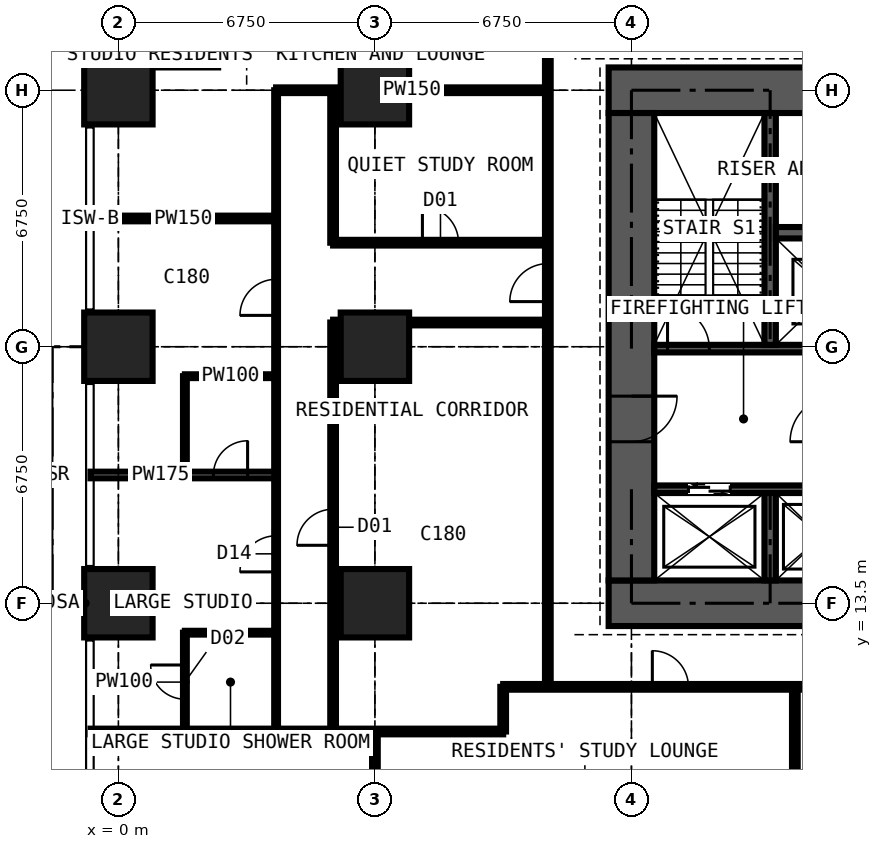
"""IFC4 building model, lengths in metres.
Left out: names, types, materials, properties, quantities, classifications, styles, units other than length and angle.
Written with IfcOpenShell. Run it as: python <this file> out.ifc"""

import sys

from ifc_helpers import new_model, si_unit, direction, frame, frame_2d, origin, origin_2d, place, context, subcontext, project, spatial, rectangle, extrude, element, fill, save


model = new_model("IFC4")
c1 = context("Model", 3, precision=1e-05, world=origin(), true_north=direction((0.0, 1.0)))
c2 = subcontext(c1, "Body", "Model", "MODEL_VIEW")
j1 = project(units=[si_unit("LENGTHUNIT", "METRE"), si_unit("PLANEANGLEUNIT", "RADIAN")], contexts=[c1])
p1 = place(None, origin())
s1 = spatial("IfcSite", under=j1, at=p1, CompositionType="ELEMENT")
p2 = place(p1, origin())
s2 = spatial("IfcBuilding", under=s1, at=p2, CompositionType="ELEMENT")
p3 = place(p2, frame((0.0, 0.0, 90.9)))
s3 = spatial("IfcBuildingStorey", under=s2, at=p3, CompositionType="ELEMENT", Elevation=90.9)
for number, where, z_axis, x_axis in (
    (1, (0.0, 13.5, 0.0), (0.0, 0.0, 1.0), (1.0, 0.0, 0.0)),
    (2, (0.0, 20.25, 0.0), (0.0, 0.0, 1.0), (1.0, 0.0, 0.0)),
    (3, (0.0, 27.0, 0.0), (0.0, 0.0, 1.0), (1.0, 0.0, 0.0)),
    (4, (6.75, 13.5, 0.0), (0.0, 0.0, 1.0), (1.0, 0.0, 0.0)),
    (5, (6.75, 20.25, 0.0), (0.0, 0.0, 1.0), (1.0, 0.0, 0.0)),
    (6, (6.75, 27.0, 0.0), (0.0, 0.0, 1.0), (1.0, 0.0, 0.0)),
):
    element("IfcColumn", number, at=place(p3, frame(where, z_axis=z_axis, x_axis=x_axis)), inside=s3, PredefinedType="COLUMN", context=c2, shape_type="SweptSolid", body=[
        extrude(rectangle(XDim=1.8, YDim=1.8, at=origin_2d()), origin(), (0.0, 0.0, 1.0), 3.6),
    ])
p4 = place(p3, frame((12.9, 13.5, 0.0), z_axis=(0.0, 0.0, 1.0), x_axis=(1.0, 0.0, 0.0)))
e7 = element("IfcWall", 7, at=p4, inside=s3, PredefinedType="SHEAR", context=c2, shape_type="SweptSolid", body=[
    extrude(rectangle(XDim=14.7, YDim=1.2, at=frame_2d((7.35, 0.0))), origin(), (0.0, 0.0, 1.0), 3.6),
])
p5 = place(p3, frame((27.6, 27.0, 0.0), z_axis=(0.0, 0.0, 1.0), x_axis=(-1.0, 0.0, 0.0)))
e8 = element("IfcWall", 8, at=p5, inside=s3, PredefinedType="SHEAR", context=c2, shape_type="SweptSolid", body=[
    extrude(rectangle(XDim=14.7, YDim=1.2, at=frame_2d((7.35, 0.0))), origin(), (0.0, 0.0, 1.0), 3.6),
])
p6 = place(p5, frame((4.55, 0.0, 0.0)))
e9 = element("IfcOpeningElement", 9, at=p6, cuts=e8, PredefinedType="OPENING", context=c2, shape_type="SweptSolid", body=[
    extrude(rectangle(XDim=0.9, YDim=2.2, at=frame_2d((0.45, 1.1))), frame((0.0, 0.61, 0.0), z_axis=(0.0, -1.0, 0.0), x_axis=(1.0, 0.0, 0.0)), (0.0, 0.0, 1.0), 1.22),
])
p7 = place(p5, frame((7.525, 0.0, 0.0)))
e10 = element("IfcOpeningElement", 10, at=p7, cuts=e8, PredefinedType="OPENING", context=c2, shape_type="SweptSolid", body=[
    extrude(rectangle(XDim=1.0, YDim=2.2, at=frame_2d((0.5, 1.1))), frame((0.0, 0.61, 0.0), z_axis=(0.0, -1.0, 0.0), x_axis=(1.0, 0.0, 0.0)), (0.0, 0.0, 1.0), 1.22),
])
p8 = place(p3, frame((13.5, 26.4, 0.0), z_axis=(0.0, 0.0, 1.0), x_axis=(0.0, -1.0, 0.0)))
e11 = element("IfcWall", 11, at=p8, inside=s3, PredefinedType="SHEAR", context=c2, shape_type="SweptSolid", body=[
    extrude(rectangle(XDim=12.3, YDim=1.2, at=frame_2d((6.15, 0.0))), origin(), (0.0, 0.0, 1.0), 3.6),
])
p9 = place(p8, frame((7.45, 0.0, 0.0)))
e12 = element("IfcOpeningElement", 12, at=p9, cuts=e11, PredefinedType="OPENING", context=c2, shape_type="SweptSolid", body=[
    extrude(rectangle(XDim=1.2, YDim=2.2, at=frame_2d((0.6, 1.1))), frame((0.0, 0.61, 0.0), z_axis=(0.0, -1.0, 0.0), x_axis=(1.0, 0.0, 0.0)), (0.0, 0.0, 1.0), 1.22),
])
p10 = place(p3, frame((2.625, 31.125, 0.0), z_axis=(0.0, 0.0, 1.0), x_axis=(0.0, -1.0, 0.0)))
e13 = element("IfcWall", 13, at=p10, inside=s3, PredefinedType="SOLIDWALL", context=c2, shape_type="SweptSolid", body=[
    extrude(rectangle(XDim=3.375, YDim=0.3, at=frame_2d((1.688, 0.0))), origin(), (0.0, 0.0, 1.0), 3.375),
])
p11 = place(p10, frame((0.788, 0.0, 0.6)))
e14 = element("IfcOpeningElement", 14, at=p11, cuts=e13, PredefinedType="OPENING", context=c2, shape_type="SweptSolid", body=[
    extrude(rectangle(XDim=1.8, YDim=2.1, at=frame_2d((0.9, 1.05))), frame((0.0, 0.16, 0.0), z_axis=(0.0, -1.0, 0.0), x_axis=(1.0, 0.0, 0.0)), (0.0, 0.0, 1.0), 0.32),
])
p12 = place(p3, frame((2.625, 27.75, 0.0), z_axis=(0.0, 0.0, 1.0), x_axis=(-1.0, 0.0, 0.0)))
e15 = element("IfcWall", 15, at=p12, inside=s3, PredefinedType="SOLIDWALL", context=c2, shape_type="SweptSolid", body=[
    extrude(rectangle(XDim=3.375, YDim=0.3, at=frame_2d((1.688, 0.0))), origin(), (0.0, 0.0, 1.0), 3.375),
])
p13 = place(p12, frame((0.343, 0.0, 0.9)))
e16 = element("IfcOpeningElement", 16, at=p13, cuts=e15, PredefinedType="OPENING", context=c2, shape_type="SweptSolid", body=[
    extrude(rectangle(XDim=1.2, YDim=1.8, at=frame_2d((0.6, 0.9))), frame((0.0, 0.16, 0.0), z_axis=(0.0, -1.0, 0.0), x_axis=(1.0, 0.0, 0.0)), (0.0, 0.0, 1.0), 0.32),
])
p14 = place(p3, frame((14.1, 16.5, 0.0), z_axis=(0.0, 0.0, 1.0), x_axis=(1.0, 0.0, 0.0)))
e17 = element("IfcWall", 17, at=p14, inside=s3, PredefinedType="SHEAR", context=c2, shape_type="SweptSolid", body=[
    extrude(rectangle(XDim=12.3, YDim=0.2, at=frame_2d((6.15, 0.0))), origin(), (0.0, 0.0, 1.0), 3.6),
])
p15 = place(p14, frame((0.9, 0.0, 0.0)))
e18 = element("IfcOpeningElement", 18, at=p15, cuts=e17, PredefinedType="OPENING", context=c2, shape_type="SweptSolid", body=[
    extrude(rectangle(XDim=1.1, YDim=2.2, at=frame_2d((0.55, 1.1))), frame((0.0, 0.11, 0.0), z_axis=(0.0, -1.0, 0.0), x_axis=(1.0, 0.0, 0.0)), (0.0, 0.0, 1.0), 0.22),
])
p16 = place(p14, frame((9.5, 0.0, 0.0)))
e19 = element("IfcOpeningElement", 19, at=p16, cuts=e17, PredefinedType="OPENING", context=c2, shape_type="SweptSolid", body=[
    extrude(rectangle(XDim=1.1, YDim=2.2, at=frame_2d((0.55, 1.1))), frame((0.0, 0.11, 0.0), z_axis=(0.0, -1.0, 0.0), x_axis=(1.0, 0.0, 0.0)), (0.0, 0.0, 1.0), 0.22),
])
p17 = place(p3, frame((14.1, 20.2, 0.0), z_axis=(0.0, 0.0, 1.0), x_axis=(1.0, 0.0, 0.0)))
e20 = element("IfcWall", 20, at=p17, inside=s3, PredefinedType="SHEAR", context=c2, shape_type="SweptSolid", body=[
    extrude(rectangle(XDim=12.3, YDim=0.2, at=frame_2d((6.15, 0.0))), origin(), (0.0, 0.0, 1.0), 3.6),
])
p18 = place(p17, frame((0.35, 0.0, 0.0)))
e21 = element("IfcOpeningElement", 21, at=p18, cuts=e20, PredefinedType="OPENING", context=c2, shape_type="SweptSolid", body=[
    extrude(rectangle(XDim=1.1, YDim=2.2, at=frame_2d((0.55, 1.1))), frame((0.0, 0.11, 0.0), z_axis=(0.0, -1.0, 0.0), x_axis=(1.0, 0.0, 0.0)), (0.0, 0.0, 1.0), 0.22),
])
p19 = place(p17, frame((9.75, 0.0, 0.0)))
e22 = element("IfcOpeningElement", 22, at=p19, cuts=e20, PredefinedType="OPENING", context=c2, shape_type="SweptSolid", body=[
    extrude(rectangle(XDim=1.1, YDim=2.2, at=frame_2d((0.55, 1.1))), frame((0.0, 0.11, 0.0), z_axis=(0.0, -1.0, 0.0), x_axis=(1.0, 0.0, 0.0)), (0.0, 0.0, 1.0), 0.22),
])
p20 = place(p3, frame((17.15, 20.3, 0.0), z_axis=(0.0, 0.0, 1.0), x_axis=(0.0, 1.0, 0.0)))
e23 = element("IfcWall", 23, at=p20, inside=s3, PredefinedType="SHEAR", context=c2, shape_type="SweptSolid", body=[
    extrude(rectangle(XDim=6.1, YDim=0.3, at=frame_2d((3.05, 0.0))), origin(), (0.0, 0.0, 1.0), 3.6),
])
p21 = place(p3, frame((17.3, 23.25, 0.0), z_axis=(0.0, 0.0, 1.0), x_axis=(1.0, 0.0, 0.0)))
e24 = element("IfcWall", 24, at=p21, inside=s3, PredefinedType="SHEAR", context=c2, shape_type="SweptSolid", body=[
    extrude(rectangle(XDim=5.9, YDim=0.3, at=frame_2d((2.95, 0.0))), origin(), (0.0, 0.0, 1.0), 3.6),
])
p22 = place(p3, frame((17.15, 14.1, 0.0), z_axis=(0.0, 0.0, 1.0), x_axis=(0.0, 1.0, 0.0)))
e25 = element("IfcWall", 25, at=p22, inside=s3, PredefinedType="SHEAR", context=c2, shape_type="SweptSolid", body=[
    extrude(rectangle(XDim=2.3, YDim=0.3, at=frame_2d((1.15, 0.0))), origin(), (0.0, 0.0, 1.0), 3.6),
])
p23 = place(p3, frame((-0.734, 10.125, 0.0), z_axis=(0.0, 0.0, 1.0), x_axis=(1.0, 0.0, 0.0)))
e26 = element("IfcWall", 26, at=p23, inside=s3, PredefinedType="PARTITIONING", context=c2, shape_type="SweptSolid", body=[
    extrude(rectangle(XDim=10.859, YDim=0.15, at=frame_2d((5.429, 0.0))), origin(), (0.0, 0.0, 1.0), 3.375),
])
p24 = place(p3, frame((-0.734, 16.875, 0.0), z_axis=(0.0, 0.0, 1.0), x_axis=(1.0, 0.0, 0.0)))
e27 = element("IfcWall", 27, at=p24, inside=s3, PredefinedType="PARTITIONING", context=c2, shape_type="SweptSolid", body=[
    extrude(rectangle(XDim=4.884, YDim=0.175, at=frame_2d((2.442, 0.0))), origin(), (0.0, 0.0, 1.0), 3.375),
])
p25 = place(p24, frame((3.234, 0.0, 0.0)))
e28 = element("IfcOpeningElement", 28, at=p25, cuts=e27, PredefinedType="OPENING", context=c2, shape_type="SweptSolid", body=[
    extrude(rectangle(XDim=0.9, YDim=2.2, at=frame_2d((0.45, 1.1))), frame((0.0, 0.097, 0.0), z_axis=(0.0, -1.0, 0.0), x_axis=(1.0, 0.0, 0.0)), (0.0, 0.0, 1.0), 0.195),
])
p26 = place(p3, frame((-0.734, 23.625, 0.0), z_axis=(0.0, 0.0, 1.0), x_axis=(1.0, 0.0, 0.0)))
e29 = element("IfcWall", 29, at=p26, inside=s3, PredefinedType="PARTITIONING", context=c2, shape_type="SweptSolid", body=[
    extrude(rectangle(XDim=4.884, YDim=0.15, at=frame_2d((2.442, 0.0))), origin(), (0.0, 0.0, 1.0), 3.375),
])
p27 = place(p3, frame((1.75, 10.125, 0.0), z_axis=(0.0, 0.0, 1.0), x_axis=(0.0, 1.0, 0.0)))
e30 = element("IfcWall", 30, at=p27, inside=s3, PredefinedType="PARTITIONING", context=c2, shape_type="SweptSolid", body=[
    extrude(rectangle(XDim=2.6, YDim=0.1, at=frame_2d((1.3, 0.0))), origin(), (0.0, 0.0, 1.0), 3.375),
])
p28 = place(p27, frame((0.85, 0.0, 0.0)))
e31 = element("IfcOpeningElement", 31, at=p28, cuts=e30, PredefinedType="OPENING", context=c2, shape_type="SweptSolid", body=[
    extrude(rectangle(XDim=0.9, YDim=2.2, at=frame_2d((0.45, 1.1))), frame((0.0, 0.06, 0.0), z_axis=(0.0, -1.0, 0.0), x_axis=(1.0, 0.0, 0.0)), (0.0, 0.0, 1.0), 0.12),
])
p29 = place(p3, frame((1.75, 12.725, 0.0), z_axis=(0.0, 0.0, 1.0), x_axis=(1.0, 0.0, 0.0)))
e32 = element("IfcWall", 32, at=p29, inside=s3, PredefinedType="PARTITIONING", context=c2, shape_type="SweptSolid", body=[
    extrude(rectangle(XDim=2.4, YDim=0.1, at=frame_2d((1.2, 0.0))), origin(), (0.0, 0.0, 1.0), 3.375),
])
p30 = place(p3, frame((1.75, 16.875, 0.0), z_axis=(0.0, 0.0, 1.0), x_axis=(0.0, 1.0, 0.0)))
e33 = element("IfcWall", 33, at=p30, inside=s3, PredefinedType="PARTITIONING", context=c2, shape_type="SweptSolid", body=[
    extrude(rectangle(XDim=2.6, YDim=0.1, at=frame_2d((1.3, 0.0))), origin(), (0.0, 0.0, 1.0), 3.375),
])
p31 = place(p3, frame((1.75, 19.475, 0.0), z_axis=(0.0, 0.0, 1.0), x_axis=(1.0, 0.0, 0.0)))
e34 = element("IfcWall", 34, at=p31, inside=s3, PredefinedType="PARTITIONING", context=c2, shape_type="SweptSolid", body=[
    extrude(rectangle(XDim=2.4, YDim=0.1, at=frame_2d((1.2, 0.0))), origin(), (0.0, 0.0, 1.0), 3.375),
])
p32 = place(p3, frame((4.15, 10.125, 0.0), z_axis=(0.0, 0.0, 1.0), x_axis=(0.0, 1.0, 0.0)))
e35 = element("IfcWall", 35, at=p32, inside=s3, PredefinedType="PARTITIONING", context=c2, shape_type="SweptSolid", body=[
    extrude(rectangle(XDim=16.875, YDim=0.1, at=frame_2d((8.438, 0.0))), origin(), (0.0, 0.0, 1.0), 3.375),
])
p33 = place(p32, frame((4.2, 0.0, 0.0)))
e36 = element("IfcOpeningElement", 36, at=p33, cuts=e35, PredefinedType="OPENING", context=c2, shape_type="SweptSolid", body=[
    extrude(rectangle(XDim=0.95, YDim=2.2, at=frame_2d((0.475, 1.1))), frame((0.0, 0.06, 0.0), z_axis=(0.0, -1.0, 0.0), x_axis=(1.0, 0.0, 0.0)), (0.0, 0.0, 1.0), 0.12),
])
p34 = place(p32, frame((10.95, 0.0, 0.0)))
e37 = element("IfcOpeningElement", 37, at=p34, cuts=e35, PredefinedType="OPENING", context=c2, shape_type="SweptSolid", body=[
    extrude(rectangle(XDim=0.95, YDim=2.2, at=frame_2d((0.475, 1.1))), frame((0.0, 0.06, 0.0), z_axis=(0.0, -1.0, 0.0), x_axis=(1.0, 0.0, 0.0)), (0.0, 0.0, 1.0), 0.12),
])
p35 = place(p3, frame((4.15, 27.0, 0.0), z_axis=(0.0, 0.0, 1.0), x_axis=(1.0, 0.0, 0.0)))
e38 = element("IfcWall", 38, at=p35, inside=s3, PredefinedType="PARTITIONING", context=c2, shape_type="SweptSolid", body=[
    extrude(rectangle(XDim=7.15, YDim=0.15, at=frame_2d((3.575, 0.0))), origin(), (0.0, 0.0, 1.0), 2.806),
])
p36 = place(p3, frame((5.65, 10.125, 0.0), z_axis=(0.0, 0.0, 1.0), x_axis=(0.0, 1.0, 0.0)))
e39 = element("IfcWall", 39, at=p36, inside=s3, PredefinedType="PARTITIONING", context=c2, shape_type="SweptSolid", body=[
    extrude(rectangle(XDim=10.762, YDim=0.15, at=frame_2d((5.381, 0.0))), origin(), (0.0, 0.0, 1.0), 3.375),
])
p37 = place(p36, frame((4.9, 0.0, 0.0)))
e40 = element("IfcOpeningElement", 40, at=p37, cuts=e39, PredefinedType="OPENING", context=c2, shape_type="SweptSolid", body=[
    extrude(rectangle(XDim=0.95, YDim=2.2, at=frame_2d((0.475, 1.1))), frame((0.0, 0.085, 0.0), z_axis=(0.0, -1.0, 0.0), x_axis=(1.0, 0.0, 0.0)), (0.0, 0.0, 1.0), 0.17),
])
p38 = place(p3, frame((5.65, 20.887, 0.0), z_axis=(0.0, 0.0, 1.0), x_axis=(1.0, 0.0, 0.0)))
e41 = element("IfcWall", 41, at=p38, inside=s3, PredefinedType="PARTITIONING", context=c2, shape_type="SweptSolid", body=[
    extrude(rectangle(XDim=5.65, YDim=0.15, at=frame_2d((2.825, 0.0))), origin(), (0.0, 0.0, 1.0), 3.375),
])
p39 = place(p3, frame((5.65, 22.988, 0.0), z_axis=(0.0, 0.0, 1.0), x_axis=(0.0, 1.0, 0.0)))
e42 = element("IfcWall", 42, at=p39, inside=s3, PredefinedType="PARTITIONING", context=c2, shape_type="SweptSolid", body=[
    extrude(rectangle(XDim=4.012, YDim=0.15, at=frame_2d((2.006, 0.0))), origin(), (0.0, 0.0, 1.0), 3.375),
])
p40 = place(p3, frame((5.65, 22.988, 0.0), z_axis=(0.0, 0.0, 1.0), x_axis=(1.0, 0.0, 0.0)))
e43 = element("IfcWall", 43, at=p40, inside=s3, PredefinedType="PARTITIONING", context=c2, shape_type="SweptSolid", body=[
    extrude(rectangle(XDim=5.65, YDim=0.15, at=frame_2d((2.825, 0.0))), origin(), (0.0, 0.0, 1.0), 3.375),
])
p41 = place(p40, frame((2.35, 0.0, 0.0)))
e44 = element("IfcOpeningElement", 44, at=p41, cuts=e43, PredefinedType="OPENING", context=c2, shape_type="SweptSolid", body=[
    extrude(rectangle(XDim=0.95, YDim=2.2, at=frame_2d((0.475, 1.1))), frame((0.0, 0.085, 0.0), z_axis=(0.0, -1.0, 0.0), x_axis=(1.0, 0.0, 0.0)), (0.0, 0.0, 1.0), 0.17),
])
p42 = place(p3, frame((6.75, 4.15, 0.0), z_axis=(0.0, 0.0, 1.0), x_axis=(0.0, 1.0, 0.0)))
e45 = element("IfcWall", 45, at=p42, inside=s3, PredefinedType="PARTITIONING", context=c2, shape_type="SweptSolid", body=[
    extrude(rectangle(XDim=5.975, YDim=0.15, at=frame_2d((2.988, 0.0))), origin(), (0.0, 0.0, 1.0), 2.877),
])
p43 = place(p3, frame((10.125, 10.125, 0.0), z_axis=(0.0, 0.0, 1.0), x_axis=(0.0, 1.0, 0.0)))
e46 = element("IfcWall", 46, at=p43, inside=s3, PredefinedType="PARTITIONING", context=c2, shape_type="SweptSolid", body=[
    extrude(rectangle(XDim=1.175, YDim=0.15, at=frame_2d((0.587, 0.0))), origin(), (0.0, 0.0, 1.0), 3.375),
])
p44 = place(p3, frame((10.125, 11.3, 0.0), z_axis=(0.0, 0.0, 1.0), x_axis=(1.0, 0.0, 0.0)))
e47 = element("IfcWall", 47, at=p44, inside=s3, PredefinedType="PARTITIONING", context=c2, shape_type="SweptSolid", body=[
    extrude(rectangle(XDim=20.675, YDim=0.15, at=frame_2d((10.337, 0.0))), origin(), (0.0, 0.0, 1.0), 3.375),
])
p45 = place(p44, frame((8.375, 0.0, 0.0)))
e48 = element("IfcOpeningElement", 48, at=p45, cuts=e47, PredefinedType="OPENING", context=c2, shape_type="SweptSolid", body=[
    extrude(rectangle(XDim=1.0, YDim=2.2, at=frame_2d((0.5, 1.1))), frame((0.0, 0.085, 0.0), z_axis=(0.0, -1.0, 0.0), x_axis=(1.0, 0.0, 0.0)), (0.0, 0.0, 1.0), 0.17),
])
p46 = place(p44, frame((10.975, 0.0, 0.0)))
e49 = element("IfcOpeningElement", 49, at=p46, cuts=e47, PredefinedType="OPENING", context=c2, shape_type="SweptSolid", body=[
    extrude(rectangle(XDim=1.0, YDim=2.2, at=frame_2d((0.5, 1.1))), frame((0.0, 0.085, 0.0), z_axis=(0.0, -1.0, 0.0), x_axis=(1.0, 0.0, 0.0)), (0.0, 0.0, 1.0), 0.17),
])
p47 = place(p44, frame((3.925, 0.0, 0.0)))
e50 = element("IfcOpeningElement", 50, at=p47, cuts=e47, PredefinedType="OPENING", context=c2, shape_type="SweptSolid", body=[
    extrude(rectangle(XDim=0.95, YDim=2.2, at=frame_2d((0.475, 1.1))), frame((0.0, 0.085, 0.0), z_axis=(0.0, -1.0, 0.0), x_axis=(1.0, 0.0, 0.0)), (0.0, 0.0, 1.0), 0.17),
])
p48 = place(p3, frame((11.3, 11.3, 0.0), z_axis=(0.0, 0.0, 1.0), x_axis=(0.0, 1.0, 0.0)))
e51 = element("IfcWall", 51, at=p48, inside=s3, PredefinedType="PARTITIONING", context=c2, shape_type="SweptSolid", body=[
    extrude(rectangle(XDim=19.3, YDim=0.15, at=frame_2d((9.65, 0.0))), origin(), (0.0, 0.0, 1.0), 3.375),
])
p49 = place(p48, frame((18.1, 0.0, 0.0)))
e52 = element("IfcOpeningElement", 52, at=p49, cuts=e51, PredefinedType="OPENING", context=c2, shape_type="SweptSolid", body=[
    extrude(rectangle(XDim=1.0, YDim=2.2, at=frame_2d((0.5, 1.1))), frame((0.0, 0.085, 0.0), z_axis=(0.0, -1.0, 0.0), x_axis=(1.0, 0.0, 0.0)), (0.0, 0.0, 1.0), 0.17),
])
p50 = place(p48, frame((10.137, 0.0, 0.0)))
e53 = element("IfcOpeningElement", 53, at=p50, cuts=e51, PredefinedType="OPENING", context=c2, shape_type="SweptSolid", body=[
    extrude(rectangle(XDim=1.0, YDim=2.2, at=frame_2d((0.5, 1.1))), frame((0.0, 0.085, 0.0), z_axis=(0.0, -1.0, 0.0), x_axis=(1.0, 0.0, 0.0)), (0.0, 0.0, 1.0), 0.17),
])
p51 = place(p3, frame((17.8, 5.65, 0.0), z_axis=(0.0, 0.0, 1.0), x_axis=(0.0, 1.0, 0.0)))
e54 = element("IfcWall", 54, at=p51, inside=s3, PredefinedType="PARTITIONING", context=c2, shape_type="SweptSolid", body=[
    extrude(rectangle(XDim=5.65, YDim=0.15, at=frame_2d((2.825, 0.0))), origin(), (0.0, 0.0, 1.0), 3.375),
])
p52 = place(p13, origin())
e55 = element("IfcWindow", 55, at=p52, inside=s3, PartitioningType="SINGLE_PANEL", PredefinedType="WINDOW", context=c2, shape_type="SweptSolid", body=[
    extrude(rectangle(XDim=1.2, YDim=1.8, at=frame_2d((0.6, 0.9))), frame((0.0, 0.03, 0.0), z_axis=(0.0, -1.0, 0.0), x_axis=(1.0, 0.0, 0.0)), (0.0, 0.0, 1.0), 0.06),
])
fill(e16, e55)
p53 = place(p15, origin())
e56 = element("IfcDoor", 56, at=p53, inside=s3, OperationType="DOUBLE_DOOR_SLIDING", PredefinedType="DOOR", context=c2, shape_type="SweptSolid", body=[
    extrude(rectangle(XDim=1.1, YDim=2.2, at=frame_2d((0.55, 1.1))), frame((0.0, 0.025, 0.0), z_axis=(0.0, -1.0, 0.0), x_axis=(1.0, 0.0, 0.0)), (0.0, 0.0, 1.0), 0.05),
])
fill(e18, e56)
p54 = place(p9, origin())
e57 = element("IfcDoor", 57, at=p54, inside=s3, OperationType="DOUBLE_DOOR_SINGLE_SWING", PredefinedType="DOOR", context=c2, shape_type="SweptSolid", body=[
    extrude(rectangle(XDim=1.2, YDim=2.2, at=frame_2d((0.6, 1.1))), frame((0.0, 0.025, 0.0), z_axis=(0.0, -1.0, 0.0), x_axis=(1.0, 0.0, 0.0)), (0.0, 0.0, 1.0), 0.05),
])
fill(e12, e57)
p55 = place(p18, origin())
e58 = element("IfcDoor", 58, at=p55, inside=s3, OperationType="SINGLE_SWING_LEFT", PredefinedType="DOOR", context=c2, shape_type="SweptSolid", body=[
    extrude(rectangle(XDim=1.1, YDim=2.2, at=frame_2d((0.55, 1.1))), frame((0.0, 0.025, 0.0), z_axis=(0.0, -1.0, 0.0), x_axis=(1.0, 0.0, 0.0)), (0.0, 0.0, 1.0), 0.05),
])
fill(e21, e58)
p56 = place(p47, origin())
e59 = element("IfcDoor", 59, at=p56, inside=s3, OperationType="SINGLE_SWING_LEFT", PredefinedType="DOOR", context=c2, shape_type="SweptSolid", body=[
    extrude(rectangle(XDim=0.95, YDim=2.2, at=frame_2d((0.475, 1.1))), frame((0.0, 0.025, 0.0), z_axis=(0.0, -1.0, 0.0), x_axis=(1.0, 0.0, 0.0)), (0.0, 0.0, 1.0), 0.05),
])
fill(e50, e59)
p57 = place(p33, origin())
e60 = element("IfcDoor", 60, at=p57, inside=s3, OperationType="SINGLE_SWING_LEFT", PredefinedType="DOOR", context=c2, shape_type="SweptSolid", body=[
    extrude(rectangle(XDim=0.95, YDim=2.2, at=frame_2d((0.475, 1.1))), frame((0.0, 0.025, 0.0), z_axis=(0.0, -1.0, 0.0), x_axis=(1.0, 0.0, 0.0)), (0.0, 0.0, 1.0), 0.05),
])
fill(e36, e60)
p58 = place(p28, origin())
e61 = element("IfcDoor", 61, at=p58, inside=s3, OperationType="SINGLE_SWING_RIGHT", PredefinedType="DOOR", context=c2, shape_type="SweptSolid", body=[
    extrude(rectangle(XDim=0.9, YDim=2.2, at=frame_2d((0.45, 1.1))), frame((0.0, 0.025, 0.0), z_axis=(0.0, -1.0, 0.0), x_axis=(1.0, 0.0, 0.0)), (0.0, 0.0, 1.0), 0.05),
])
fill(e31, e61)
p59 = place(p34, origin())
e62 = element("IfcDoor", 62, at=p59, inside=s3, OperationType="SINGLE_SWING_LEFT", PredefinedType="DOOR", context=c2, shape_type="SweptSolid", body=[
    extrude(rectangle(XDim=0.95, YDim=2.2, at=frame_2d((0.475, 1.1))), frame((0.0, 0.025, 0.0), z_axis=(0.0, -1.0, 0.0), x_axis=(1.0, 0.0, 0.0)), (0.0, 0.0, 1.0), 0.05),
])
fill(e37, e62)
p60 = place(p25, origin())
e63 = element("IfcDoor", 63, at=p60, inside=s3, OperationType="SINGLE_SWING_RIGHT", PredefinedType="DOOR", context=c2, shape_type="SweptSolid", body=[
    extrude(rectangle(XDim=0.9, YDim=2.2, at=frame_2d((0.45, 1.1))), frame((0.0, 0.025, 0.0), z_axis=(0.0, -1.0, 0.0), x_axis=(1.0, 0.0, 0.0)), (0.0, 0.0, 1.0), 0.05),
])
fill(e28, e63)
p61 = place(p50, origin())
e64 = element("IfcDoor", 64, at=p61, inside=s3, OperationType="SINGLE_SWING_LEFT", PredefinedType="DOOR", context=c2, shape_type="SweptSolid", body=[
    extrude(rectangle(XDim=1.0, YDim=2.2, at=frame_2d((0.5, 1.1))), frame((0.0, 0.025, 0.0), z_axis=(0.0, -1.0, 0.0), x_axis=(1.0, 0.0, 0.0)), (0.0, 0.0, 1.0), 0.05),
])
fill(e53, e64)
p62 = place(p37, origin())
e65 = element("IfcDoor", 65, at=p62, inside=s3, OperationType="SINGLE_SWING_LEFT", PredefinedType="DOOR", context=c2, shape_type="SweptSolid", body=[
    extrude(rectangle(XDim=0.95, YDim=2.2, at=frame_2d((0.475, 1.1))), frame((0.0, 0.025, 0.0), z_axis=(0.0, -1.0, 0.0), x_axis=(1.0, 0.0, 0.0)), (0.0, 0.0, 1.0), 0.05),
])
fill(e40, e65)
p63 = place(p41, origin())
e66 = element("IfcDoor", 66, at=p63, inside=s3, OperationType="SINGLE_SWING_LEFT", PredefinedType="DOOR", context=c2, shape_type="SweptSolid", body=[
    extrude(rectangle(XDim=0.95, YDim=2.2, at=frame_2d((0.475, 1.1))), frame((0.0, 0.025, 0.0), z_axis=(0.0, -1.0, 0.0), x_axis=(1.0, 0.0, 0.0)), (0.0, 0.0, 1.0), 0.05),
])
fill(e44, e66)
save(model, sys.argv[1])
